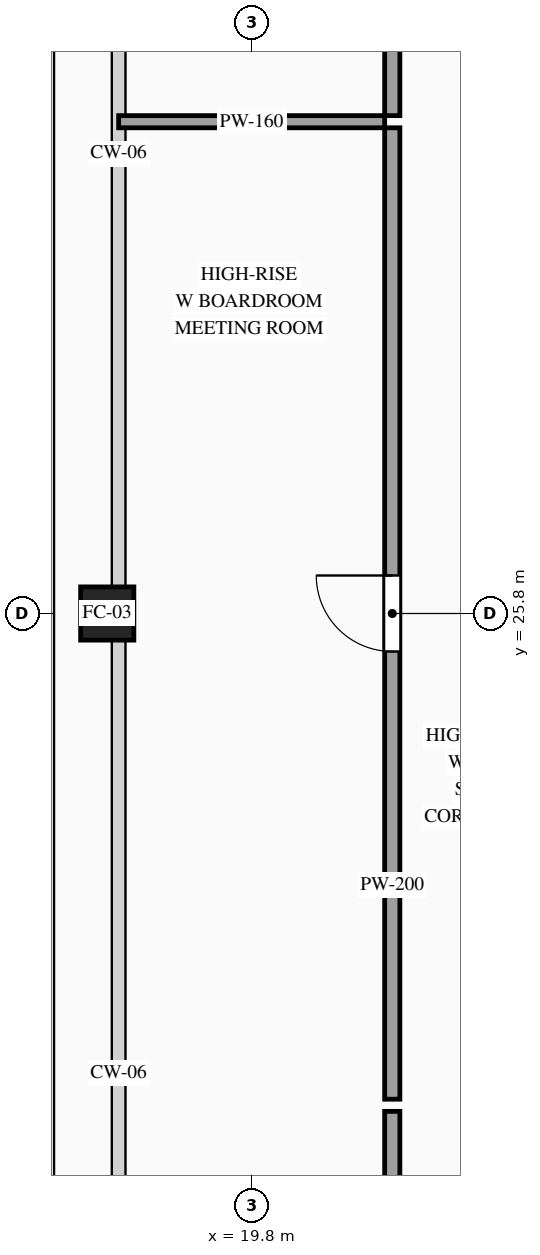
"""IFC4 building model, lengths in metres.
Left out: names, types, materials, properties, quantities, classifications, styles, units other than length and angle.
Written with IfcOpenShell. Run it as: python <this file> out.ifc"""

import sys

from ifc_helpers import new_model, si_unit, direction, frame, frame_2d, origin, origin_2d, place, context, subcontext, project, spatial, rectangle, hollow_rectangle, extrude, source, transform, mapped, element, fill, save


model = new_model("IFC4")
c1 = context("Model", 3, precision=1e-05, world=origin(), true_north=direction((0.0, 1.0)))
c2 = subcontext(c1, "Body", "Model", "MODEL_VIEW")
j1 = project(units=[si_unit("LENGTHUNIT", "METRE"), si_unit("PLANEANGLEUNIT", "RADIAN")], contexts=[c1])
p1 = place(None, origin())
s1 = spatial("IfcSite", under=j1, at=p1, CompositionType="ELEMENT")
p2 = place(p1, origin())
s2 = spatial("IfcBuilding", under=s1, at=p2, CompositionType="ELEMENT")
p3 = place(p2, frame((0.0, 0.0, 285.6)))
s3 = spatial("IfcBuildingStorey", under=s2, at=p3, CompositionType="ELEMENT", Elevation=285.6)
m1 = source(origin(), c2, "Body", "SweptSolid", [
    extrude(hollow_rectangle(XDim=0.7, YDim=0.7, WallThickness=0.032, at=origin_2d()), origin(), (0.0, 0.0, 1.0), 3.5),
])
p4 = place(p3, frame((17.9, 25.8, 0.0), z_axis=(0.0, 0.0, 1.0), x_axis=(1.0, 0.0, 0.0)))
e1 = element("IfcColumn", 1, at=p4, inside=s3, PredefinedType="COLUMN", context=c2, shape_type="MappedRepresentation", body=[
    mapped(m1, transform((0.0, 0.0, 0.0), scale=1.0)),
])
m2 = source(origin(), c2, "Body", "SweptSolid", [
    extrude(rectangle(XDim=1.7, YDim=0.2, at=frame_2d((0.85, 0.0))), origin(), (0.0, 0.0, 1.0), 3.28),
])
for number, where, z_axis, x_axis in (
    (2, (21.65, 32.35, 0.0), (0.0, 0.0, 1.0), (0.0, 1.0, 0.0)),
    (3, (21.65, 17.55, 0.0), (0.0, 0.0, 1.0), (0.0, 1.0, 0.0)),
):
    element("IfcWall", number, at=place(p3, frame(where, z_axis=z_axis, x_axis=x_axis)), inside=s3, PredefinedType="PARTITIONING", context=c2, shape_type="MappedRepresentation", body=[
        mapped(m2, transform((0.0, 0.0, 0.0), scale=1.0)),
    ])
p5 = place(p3, frame((21.65, 19.41, 0.0), z_axis=(0.0, 0.0, 1.0), x_axis=(0.0, 1.0, 0.0)))
e4 = element("IfcWall", 4, at=p5, inside=s3, PredefinedType="PARTITIONING", context=c2, shape_type="SweptSolid", body=[
    extrude(rectangle(XDim=12.78, YDim=0.2, at=frame_2d((6.39, 0.0))), origin(), (0.0, 0.0, 1.0), 3.28),
])
p6 = place(p5, frame((5.89, 0.0, 0.0)))
e5 = element("IfcOpeningElement", 5, at=p6, cuts=e4, PredefinedType="OPENING", context=c2, shape_type="SweptSolid", body=[
    extrude(rectangle(XDim=1.0, YDim=2.2, at=frame_2d((0.5, 1.1))), frame((0.0, 0.115, 0.0), z_axis=(0.0, -1.0, 0.0), x_axis=(1.0, 0.0, 0.0)), (0.0, 0.0, 1.0), 0.23),
])
m3 = source(origin(), c2, "Body", "SweptSolid", [
    extrude(rectangle(XDim=3.5, YDim=0.16, at=frame_2d((1.75, 0.0))), origin(), (0.0, 0.0, 1.0), 2.825),
])
p7 = place(p3, frame((18.05, 32.27, 0.0), z_axis=(0.0, 0.0, 1.0), x_axis=(1.0, 0.0, 0.0)))
e6 = element("IfcWall", 6, at=p7, inside=s3, PredefinedType="PARTITIONING", context=c2, shape_type="MappedRepresentation", body=[
    mapped(m3, transform((0.0, 0.0, 0.0), scale=1.0)),
])
m4 = source(origin(), c2, "Body", "SweptSolid", [
    extrude(rectangle(XDim=1.0, YDim=2.2, at=frame_2d((0.5, 1.1))), frame((0.0, 0.025, 0.0), z_axis=(0.0, -1.0, 0.0), x_axis=(1.0, 0.0, 0.0)), (0.0, 0.0, 1.0), 0.05),
])
p8 = place(p6, origin())
e7 = element("IfcDoor", 7, at=p8, inside=s3, OperationType="SINGLE_SWING_RIGHT", PredefinedType="DOOR", context=c2, shape_type="MappedRepresentation", body=[
    mapped(m4, transform((0.0, 0.0, 0.0), scale=1.0)),
])
fill(e5, e7)
save(model, sys.argv[1])
